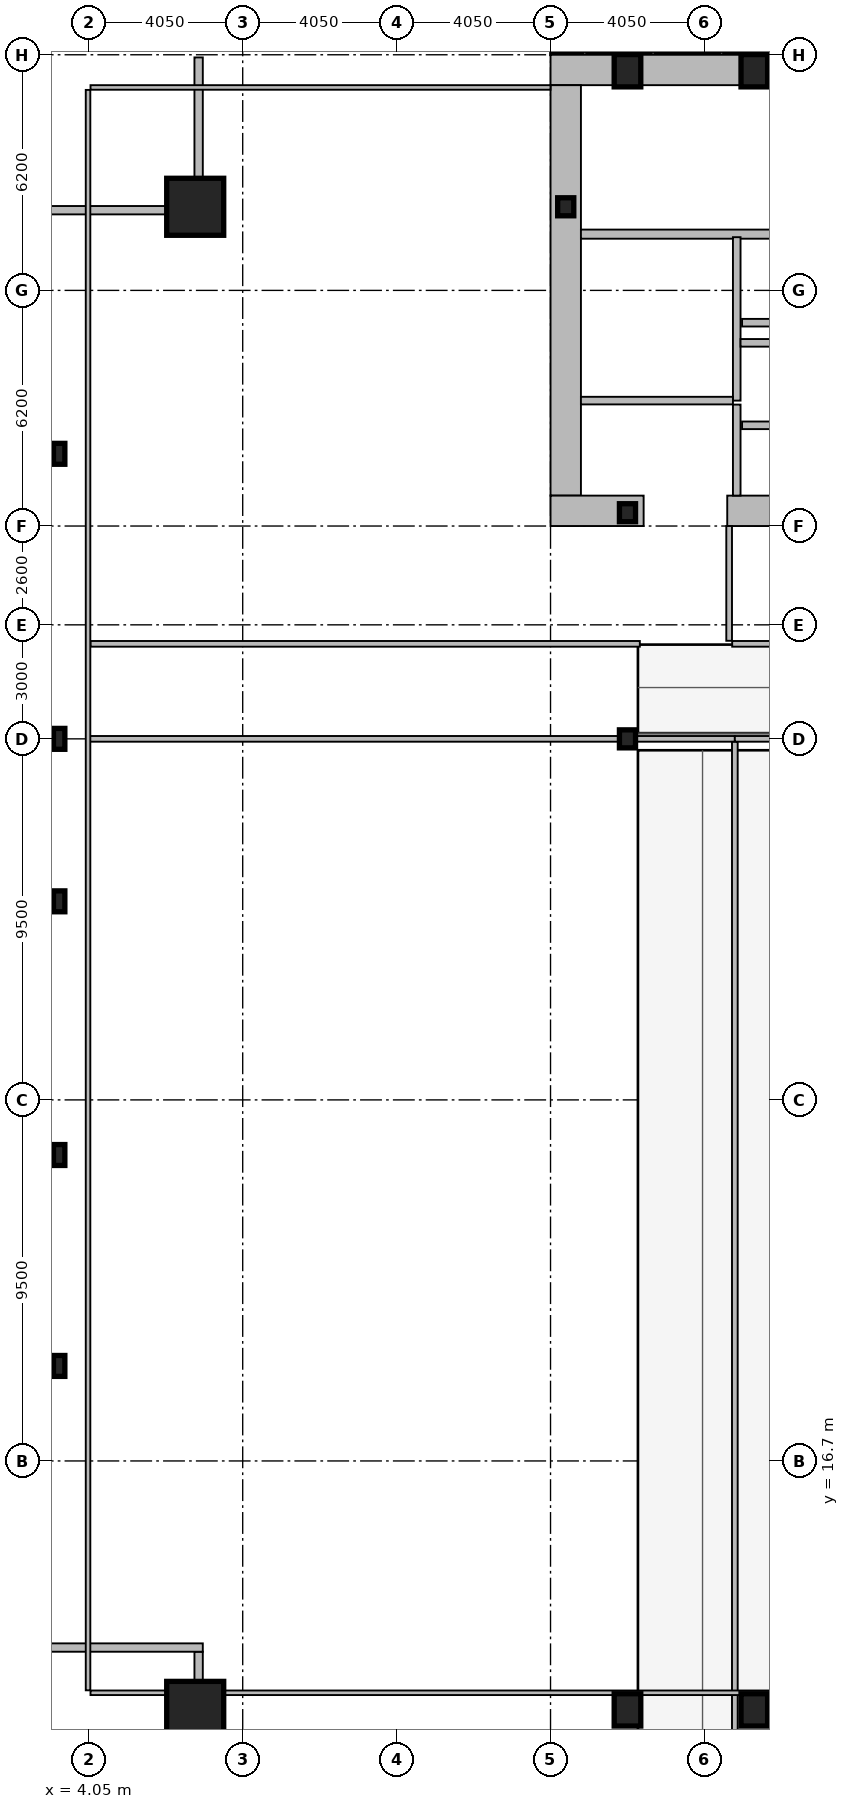
"""IFC4 building model, lengths in metres.
Left out: names, types, materials, properties, quantities, classifications, styles, units other than length and angle.
Written with IfcOpenShell. Run it as: python <this file> out.ifc"""

import sys

from ifc_helpers import new_model, si_unit, direction, frame, frame_2d, origin, origin_2d, place, context, subcontext, project, spatial, rectangle, hollow_rectangle, i_section, extrude, element, fill, save


model = new_model("IFC4")
c1 = context("Model", 3, precision=1e-05, world=origin(), true_north=direction((0.0, 1.0)))
c2 = subcontext(c1, "Body", "Model", "MODEL_VIEW")
j1 = project(units=[si_unit("LENGTHUNIT", "METRE"), si_unit("PLANEANGLEUNIT", "RADIAN")], contexts=[c1])
p1 = place(None, origin())
s1 = spatial("IfcSite", under=j1, at=p1, CompositionType="ELEMENT")
p2 = place(p1, origin())
s2 = spatial("IfcBuilding", under=s1, at=p2, CompositionType="ELEMENT")
p3 = place(p2, frame((0.0, 0.0, 85.8)))
s3 = spatial("IfcBuildingStorey", under=s2, at=p3, CompositionType="ELEMENT", Elevation=85.8)
p4 = place(p3, frame((16.2, 53.3, 0.0), z_axis=(0.0, 0.0, 1.0), x_axis=(1.0, 0.0, 0.0)))
e1 = element("IfcWall", 1, at=p4, inside=s3, PredefinedType="SHEAR", context=c2, shape_type="SweptSolid", body=[
    extrude(rectangle(XDim=40.5, YDim=0.8, at=frame_2d((20.25, 0.0))), origin(), (0.0, 0.0, 1.0), 4.62),
])
p5 = place(p3, frame((16.6, 42.1, 0.0), z_axis=(0.0, 0.0, 1.0), x_axis=(0.0, 1.0, 0.0)))
e2 = element("IfcWall", 2, at=p5, inside=s3, PredefinedType="SHEAR", context=c2, shape_type="SweptSolid", body=[
    extrude(rectangle(XDim=10.8, YDim=0.8, at=frame_2d((5.4, 0.0))), origin(), (0.0, 0.0, 1.0), 4.62),
])
p6 = place(p3, frame((18.65, 41.7, 0.0), z_axis=(0.0, 0.0, 1.0), x_axis=(-1.0, 0.0, 0.0)))
e3 = element("IfcWall", 3, at=p6, inside=s3, PredefinedType="SHEAR", context=c2, shape_type="SweptSolid", body=[
    extrude(rectangle(XDim=2.45, YDim=0.8, at=frame_2d((1.225, 0.0))), origin(), (0.0, 0.0, 1.0), 4.62),
])
p7 = place(p3, frame((32.3, 41.7, 0.0), z_axis=(0.0, 0.0, 1.0), x_axis=(-1.0, 0.0, 0.0)))
e4 = element("IfcWall", 4, at=p7, inside=s3, PredefinedType="SHEAR", context=c2, shape_type="SweptSolid", body=[
    extrude(rectangle(XDim=11.45, YDim=0.8, at=frame_2d((5.725, 0.0))), origin(), (0.0, 0.0, 1.0), 4.62),
])
p8 = place(p3, frame((17.0, 48.98, 0.0), z_axis=(0.0, 0.0, 1.0), x_axis=(1.0, 0.0, 0.0)))
e5 = element("IfcWall", 5, at=p8, inside=s3, PredefinedType="SHEAR", context=c2, shape_type="SweptSolid", body=[
    extrude(rectangle(XDim=7.22, YDim=0.24, at=frame_2d((3.61, 0.0))), origin(), (0.0, 0.0, 1.0), 4.62),
])
p9 = place(p8, frame((0.22, 0.0, 0.0)))
e6 = element("IfcOpeningElement", 6, at=p9, cuts=e5, PredefinedType="OPENING", context=c2, shape_type="SweptSolid", body=[
    extrude(rectangle(XDim=1.05, YDim=2.15, at=frame_2d((0.525, 1.075))), frame((0.0, 0.13, 0.0), z_axis=(0.0, -1.0, 0.0), x_axis=(1.0, 0.0, 0.0)), (0.0, 0.0, 1.0), 0.26),
])
for number, where, z_axis, x_axis in (
    (7, (6.85, 10.15, 0.0), (0.0, 0.0, 1.0), (1.0, 0.0, 0.0)),
    (8, (6.85, 49.7, 0.0), (0.0, 0.0, 1.0), (1.0, 0.0, 0.0)),
):
    element("IfcColumn", number, at=place(p3, frame(where, z_axis=z_axis, x_axis=x_axis)), inside=s3, PredefinedType="COLUMN", context=c2, shape_type="SweptSolid", body=[
        extrude(hollow_rectangle(XDim=1.5, YDim=1.5, WallThickness=0.07, at=origin_2d()), origin(), (0.0, 0.0, 1.0), 4.8),
    ])
for number, where, z_axis, x_axis in (
    (9, (18.225, 10.15, 0.0), (0.0, 0.0, 1.0), (1.0, 0.0, 0.0)),
    (10, (21.562, 10.15, 0.0), (0.0, 0.0, 1.0), (1.0, 0.0, 0.0)),
    (11, (18.225, 53.28, 0.0), (0.0, 0.0, 1.0), (1.0, 0.0, 0.0)),
    (12, (21.562, 53.28, 0.0), (0.0, 0.0, 1.0), (1.0, 0.0, 0.0)),
):
    element("IfcColumn", number, at=place(p3, frame(where, z_axis=z_axis, x_axis=x_axis)), inside=s3, PredefinedType="COLUMN", context=c2, shape_type="SweptSolid", body=[
        extrude(hollow_rectangle(XDim=0.7, YDim=0.85, WallThickness=0.05, at=origin_2d()), origin(), (0.0, 0.0, 1.0), 4.8),
    ])
for number, where, z_axis, x_axis in (
    (13, (3.27, 19.2, 0.0), (0.0, 0.0, 1.0), (1.0, 0.0, 0.0)),
    (14, (3.27, 24.75, 0.0), (0.0, 0.0, 1.0), (1.0, 0.0, 0.0)),
    (15, (3.27, 31.425, 0.0), (0.0, 0.0, 1.0), (1.0, 0.0, 0.0)),
    (16, (3.27, 35.7, 0.0), (0.0, 0.0, 1.0), (1.0, 0.0, 0.0)),
    (17, (3.27, 43.2, 0.0), (0.0, 0.0, 1.0), (1.0, 0.0, 0.0)),
):
    element("IfcColumn", number, at=place(p3, frame(where, z_axis=z_axis, x_axis=x_axis)), inside=s3, PredefinedType="COLUMN", context=c2, shape_type="SweptSolid", body=[
        extrude(i_section(OverallWidth=0.3, OverallDepth=0.55, WebThickness=0.015, FlangeThickness=0.029, at=origin_2d()), origin(), (0.0, 0.0, 1.0), 4.8),
    ])
for number, where, z_axis, x_axis in (
    (18, (16.6, 49.7, 0.0), (0.0, 0.0, 1.0), (1.0, 0.0, 0.0)),
    (19, (18.225, 35.7, 0.0), (0.0, 0.0, 1.0), (1.0, 0.0, 0.0)),
    (20, (18.225, 41.65, 0.0), (0.0, 0.0, 1.0), (1.0, 0.0, 0.0)),
):
    element("IfcColumn", number, at=place(p3, frame(where, z_axis=z_axis, x_axis=x_axis)), inside=s3, PredefinedType="COLUMN", context=c2, shape_type="SweptSolid", body=[
        extrude(i_section(OverallWidth=0.424, OverallDepth=0.474, WebThickness=0.048, FlangeThickness=0.077, at=origin_2d()), origin(), (0.0, 0.0, 1.0), 4.8),
    ])
p10 = place(p3, frame((6.94, 7.77, 0.0), z_axis=(0.0, 0.0, 1.0), x_axis=(0.0, 1.0, 0.0)))
e21 = element("IfcWall", 21, at=p10, inside=s3, PredefinedType="SOLIDWALL", context=c2, shape_type="SweptSolid", body=[
    extrude(rectangle(XDim=3.91, YDim=0.22, at=frame_2d((1.955, 0.0))), origin(), (0.0, 0.0, 1.0), 3.96),
])
for number, where, z_axis, x_axis in (
    (22, (7.05, 11.79, 0.0), (0.0, 0.0, 1.0), (-1.0, 0.0, 0.0)),
    (23, (2.83, 49.61, 0.0), (0.0, 0.0, 1.0), (1.0, 0.0, 0.0)),
):
    element("IfcWall", number, at=place(p3, frame(where, z_axis=z_axis, x_axis=x_axis)), inside=s3, PredefinedType="SOLIDWALL", context=c2, shape_type="SweptSolid", body=[
        extrude(rectangle(XDim=4.22, YDim=0.22, at=frame_2d((2.11, 0.0))), origin(), (0.0, 0.0, 1.0), 3.96),
    ])
p11 = place(p3, frame((6.94, 49.72, 0.0), z_axis=(0.0, 0.0, 1.0), x_axis=(0.0, 1.0, 0.0)))
e24 = element("IfcWall", 24, at=p11, inside=s3, PredefinedType="SOLIDWALL", context=c2, shape_type="SweptSolid", body=[
    extrude(rectangle(XDim=3.91, YDim=0.22, at=frame_2d((1.955, 0.0))), origin(), (0.0, 0.0, 1.0), 3.96),
])
p12 = place(p3, frame((24.21, 43.95, 0.0), z_axis=(0.0, 0.0, 1.0), x_axis=(-1.0, 0.0, 0.0)))
e25 = element("IfcWall", 25, at=p12, inside=s3, PredefinedType="PARTITIONING", context=c2, shape_type="SweptSolid", body=[
    extrude(rectangle(XDim=2.97, YDim=0.2, at=frame_2d((1.485, 0.0))), origin(), (0.0, 0.0, 1.0), 4.62),
])
p13 = place(p12, frame((0.86, 0.0, 0.0)))
e26 = element("IfcOpeningElement", 26, at=p13, cuts=e25, PredefinedType="OPENING", context=c2, shape_type="SweptSolid", body=[
    extrude(rectangle(XDim=1.3, YDim=2.18, at=frame_2d((0.65, 1.09))), frame((0.0, 0.11, 0.0), z_axis=(0.0, -1.0, 0.0), x_axis=(1.0, 0.0, 0.0)), (0.0, 0.0, 1.0), 0.22),
])
p14 = place(p3, frame((24.21, 46.65, 0.0), z_axis=(0.0, 0.0, 1.0), x_axis=(-1.0, 0.0, 0.0)))
e27 = element("IfcWall", 27, at=p14, inside=s3, PredefinedType="PARTITIONING", context=c2, shape_type="SweptSolid", body=[
    extrude(rectangle(XDim=2.97, YDim=0.2, at=frame_2d((1.485, 0.0))), origin(), (0.0, 0.0, 1.0), 4.62),
])
p15 = place(p14, frame((0.91, 0.0, 0.0)))
e28 = element("IfcOpeningElement", 28, at=p15, cuts=e27, PredefinedType="OPENING", context=c2, shape_type="SweptSolid", body=[
    extrude(rectangle(XDim=1.2, YDim=2.18, at=frame_2d((0.6, 1.09))), frame((0.0, 0.11, 0.0), z_axis=(0.0, -1.0, 0.0), x_axis=(1.0, 0.0, 0.0)), (0.0, 0.0, 1.0), 0.22),
])
p16 = place(p3, frame((21.1, 44.6, 0.0), z_axis=(0.0, 0.0, 1.0), x_axis=(0.0, 1.0, 0.0)))
e29 = element("IfcWall", 29, at=p16, inside=s3, PredefinedType="PARTITIONING", context=c2, shape_type="SweptSolid", body=[
    extrude(rectangle(XDim=4.3, YDim=0.2, at=frame_2d((2.15, 0.0))), origin(), (0.0, 0.0, 1.0), 4.62),
])
p17 = place(p3, frame((17.0, 44.6, 0.0), z_axis=(0.0, 0.0, 1.0), x_axis=(1.0, 0.0, 0.0)))
e30 = element("IfcWall", 30, at=p17, inside=s3, PredefinedType="PARTITIONING", context=c2, shape_type="SweptSolid", body=[
    extrude(rectangle(XDim=4.0, YDim=0.2, at=frame_2d((2.0, 0.0))), origin(), (0.0, 0.0, 1.0), 4.62),
])
p18 = place(p17, frame((1.25, 0.0, 0.0)))
e31 = element("IfcOpeningElement", 31, at=p18, cuts=e30, PredefinedType="OPENING", context=c2, shape_type="SweptSolid", body=[
    extrude(rectangle(XDim=1.05, YDim=2.15, at=frame_2d((0.525, 1.075))), frame((0.0, 0.11, 0.0), z_axis=(0.0, -1.0, 0.0), x_axis=(1.0, 0.0, 0.0)), (0.0, 0.0, 1.0), 0.22),
])
p19 = place(p3, frame((21.2, 46.12, 0.0), z_axis=(0.0, 0.0, 1.0), x_axis=(1.0, 0.0, 0.0)))
e32 = element("IfcWall", 32, at=p19, inside=s3, PredefinedType="PARTITIONING", context=c2, shape_type="SweptSolid", body=[
    extrude(rectangle(XDim=3.02, YDim=0.2, at=frame_2d((1.51, 0.0))), origin(), (0.0, 0.0, 1.0), 4.62),
])
p20 = place(p3, frame((21.1, 42.1, 0.0), z_axis=(0.0, 0.0, 1.0), x_axis=(0.0, 1.0, 0.0)))
e33 = element("IfcWall", 33, at=p20, inside=s3, PredefinedType="PARTITIONING", context=c2, shape_type="SweptSolid", body=[
    extrude(rectangle(XDim=2.395, YDim=0.2, at=frame_2d((1.198, 0.0))), origin(), (0.0, 0.0, 1.0), 4.62),
])
p21 = place(p20, frame((0.38, 0.0, 0.0)))
e34 = element("IfcOpeningElement", 34, at=p21, cuts=e33, PredefinedType="OPENING", context=c2, shape_type="SweptSolid", body=[
    extrude(rectangle(XDim=1.05, YDim=2.15, at=frame_2d((0.525, 1.075))), frame((0.0, 0.11, 0.0), z_axis=(0.0, -1.0, 0.0), x_axis=(1.0, 0.0, 0.0)), (0.0, 0.0, 1.0), 0.22),
])
p22 = place(p3, frame((4.03, 35.7, 0.0), z_axis=(0.0, 0.0, 1.0), x_axis=(1.0, 0.0, 0.0)))
e35 = element("IfcWall", 35, at=p22, inside=s3, PredefinedType="PARTITIONING", context=c2, shape_type="SweptSolid", body=[
    extrude(rectangle(XDim=17.02, YDim=0.15, at=frame_2d((8.51, 0.0))), origin(), (0.0, 0.0, 1.0), 3.81),
])
p23 = place(p22, frame((2.4, 0.0, 0.0)))
e36 = element("IfcOpeningElement", 36, at=p23, cuts=e35, PredefinedType="OPENING", context=c2, shape_type="SweptSolid", body=[
    extrude(rectangle(XDim=1.5, YDim=2.15, at=frame_2d((0.75, 1.075))), frame((0.0, 0.085, 0.0), z_axis=(0.0, -1.0, 0.0), x_axis=(1.0, 0.0, 0.0)), (0.0, 0.0, 1.0), 0.17),
])
p24 = place(p3, frame((21.05, 35.7, 0.0), z_axis=(0.0, 0.0, 1.0), x_axis=(1.0, 0.0, 0.0)))
e37 = element("IfcWall", 37, at=p24, inside=s3, PredefinedType="PARTITIONING", context=c2, shape_type="SweptSolid", body=[
    extrude(rectangle(XDim=4.4, YDim=0.15, at=frame_2d((2.2, 0.0))), origin(), (0.0, 0.0, 1.0), 3.81),
])
p25 = place(p3, frame((21.05, 7.82, 0.0), z_axis=(0.0, 0.0, 1.0), x_axis=(0.0, 1.0, 0.0)))
e38 = element("IfcWall", 38, at=p25, inside=s3, PredefinedType="PARTITIONING", context=c2, shape_type="SweptSolid", body=[
    extrude(rectangle(XDim=27.8, YDim=0.15, at=frame_2d((13.9, 0.0))), origin(), (0.0, 0.0, 1.0), 3.81),
])
p26 = place(p3, frame((20.98, 38.2, 0.0), z_axis=(0.0, 0.0, 1.0), x_axis=(1.0, 0.0, 0.0)))
e39 = element("IfcWall", 39, at=p26, inside=s3, PredefinedType="PARTITIONING", context=c2, shape_type="SweptSolid", body=[
    extrude(rectangle(XDim=3.54, YDim=0.15, at=frame_2d((1.77, 0.0))), origin(), (0.0, 0.0, 1.0), 3.81),
])
p27 = place(p26, frame((1.1, 0.0, 0.0)))
e40 = element("IfcOpeningElement", 40, at=p27, cuts=e39, PredefinedType="OPENING", context=c2, shape_type="SweptSolid", body=[
    extrude(rectangle(XDim=0.95, YDim=2.05, at=frame_2d((0.475, 1.025))), frame((0.0, 0.085, 0.0), z_axis=(0.0, -1.0, 0.0), x_axis=(1.0, 0.0, 0.0)), (0.0, 0.0, 1.0), 0.17),
])
p28 = place(p3, frame((20.9, 38.28, 0.0), z_axis=(0.0, 0.0, 1.0), x_axis=(0.0, 1.0, 0.0)))
e41 = element("IfcWall", 41, at=p28, inside=s3, PredefinedType="PARTITIONING", context=c2, shape_type="SweptSolid", body=[
    extrude(rectangle(XDim=3.02, YDim=0.15, at=frame_2d((1.51, 0.0))), origin(), (0.0, 0.0, 1.0), 4.62),
])
p29 = place(p3, frame((4.095, 38.2, 0.0), z_axis=(0.0, 0.0, 1.0), x_axis=(1.0, 0.0, 0.0)))
e42 = element("IfcWall", 42, at=p29, inside=s3, PredefinedType="PARTITIONING", context=c2, shape_type="SweptSolid", body=[
    extrude(rectangle(XDim=14.455, YDim=0.15, at=frame_2d((7.228, 0.0))), origin(), (0.0, 0.0, 1.0), 3.81),
])
p30 = place(p29, frame((2.4, 0.0, 0.0)))
e43 = element("IfcOpeningElement", 43, at=p30, cuts=e42, PredefinedType="OPENING", context=c2, shape_type="SweptSolid", body=[
    extrude(rectangle(XDim=0.95, YDim=2.1, at=frame_2d((0.475, 1.05))), frame((0.0, 0.085, 0.0), z_axis=(0.0, -1.0, 0.0), x_axis=(1.0, 0.0, 0.0)), (0.0, 0.0, 1.0), 0.17),
])
p31 = place(p3, frame((4.03, 10.665, 0.0), z_axis=(0.0, 0.0, 1.0), x_axis=(0.0, 1.0, 0.0)))
e44 = element("IfcWall", 44, at=p31, inside=s3, PredefinedType="PARTITIONING", context=c2, shape_type="SweptSolid", body=[
    extrude(rectangle(XDim=42.11, YDim=0.12, at=frame_2d((21.055, 0.0))), origin(), (0.0, 0.0, 1.0), 3.81),
])
p32 = place(p3, frame((4.095, 52.84, 0.0), z_axis=(0.0, 0.0, 1.0), x_axis=(1.0, 0.0, 0.0)))
e45 = element("IfcWall", 45, at=p32, inside=s3, PredefinedType="PARTITIONING", context=c2, shape_type="SweptSolid", body=[
    extrude(rectangle(XDim=12.105, YDim=0.12, at=frame_2d((6.052, 0.0))), origin(), (0.0, 0.0, 1.0), 4.62),
])
p33 = place(p3, frame((4.095, 10.6, 0.0), z_axis=(0.0, 0.0, 1.0), x_axis=(1.0, 0.0, 0.0)))
e46 = element("IfcWall", 46, at=p33, inside=s3, PredefinedType="PARTITIONING", context=c2, shape_type="SweptSolid", body=[
    extrude(rectangle(XDim=64.71, YDim=0.12, at=frame_2d((32.355, 0.0))), origin(), (0.0, 0.0, 1.0), 3.81),
])
p34 = place(p9, origin())
e47 = element("IfcDoor", 47, at=p34, inside=s3, OperationType="SINGLE_SWING_LEFT", PredefinedType="DOOR", context=c2, shape_type="SweptSolid", body=[
    extrude(rectangle(XDim=1.05, YDim=2.15, at=frame_2d((0.525, 1.075))), frame((0.0, 0.025, 0.0), z_axis=(0.0, -1.0, 0.0), x_axis=(1.0, 0.0, 0.0)), (0.0, 0.0, 1.0), 0.05),
])
fill(e6, e47)
p35 = place(p18, origin())
e48 = element("IfcDoor", 48, at=p35, inside=s3, OperationType="SINGLE_SWING_RIGHT", PredefinedType="DOOR", context=c2, shape_type="SweptSolid", body=[
    extrude(rectangle(XDim=1.05, YDim=2.15, at=frame_2d((0.525, 1.075))), frame((0.0, 0.025, 0.0), z_axis=(0.0, -1.0, 0.0), x_axis=(1.0, 0.0, 0.0)), (0.0, 0.0, 1.0), 0.05),
])
fill(e31, e48)
p36 = place(p21, origin())
e49 = element("IfcDoor", 49, at=p36, inside=s3, OperationType="SINGLE_SWING_LEFT", PredefinedType="DOOR", context=c2, shape_type="SweptSolid", body=[
    extrude(rectangle(XDim=1.05, YDim=2.15, at=frame_2d((0.525, 1.075))), frame((0.0, 0.025, 0.0), z_axis=(0.0, -1.0, 0.0), x_axis=(1.0, 0.0, 0.0)), (0.0, 0.0, 1.0), 0.05),
])
fill(e34, e49)
p37 = place(p23, origin())
e50 = element("IfcDoor", 50, at=p37, inside=s3, OperationType="DOUBLE_DOOR_SINGLE_SWING", PredefinedType="DOOR", context=c2, shape_type="SweptSolid", body=[
    extrude(rectangle(XDim=1.5, YDim=2.15, at=frame_2d((0.75, 1.075))), frame((0.0, 0.025, 0.0), z_axis=(0.0, -1.0, 0.0), x_axis=(1.0, 0.0, 0.0)), (0.0, 0.0, 1.0), 0.05),
])
fill(e36, e50)
p38 = place(p30, origin())
e51 = element("IfcDoor", 51, at=p38, inside=s3, OperationType="SINGLE_SWING_RIGHT", PredefinedType="DOOR", context=c2, shape_type="SweptSolid", body=[
    extrude(rectangle(XDim=0.95, YDim=2.1, at=frame_2d((0.475, 1.05))), frame((0.0, 0.025, 0.0), z_axis=(0.0, -1.0, 0.0), x_axis=(1.0, 0.0, 0.0)), (0.0, 0.0, 1.0), 0.05),
])
fill(e43, e51)
save(model, sys.argv[1])
